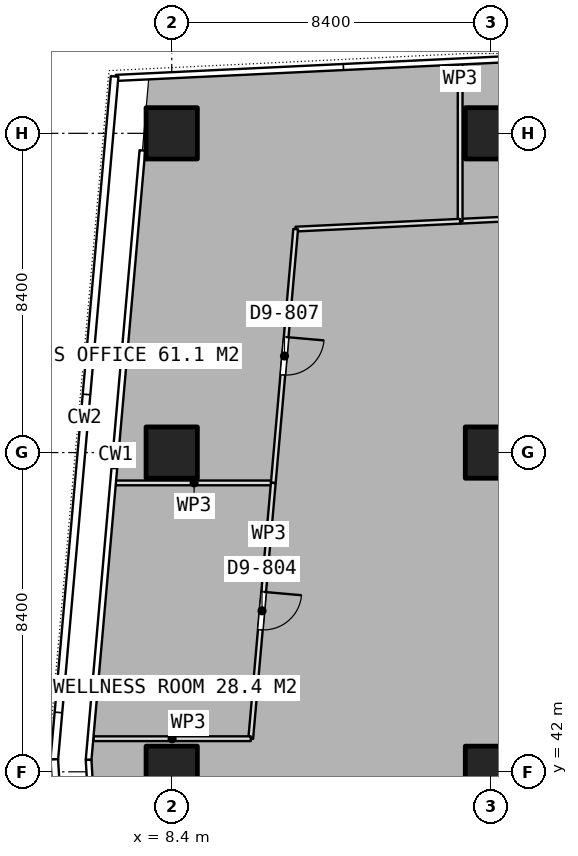
"""IFC4 building model, lengths in metres.
Left out: names, types, materials, properties, quantities, classifications, styles, units other than length and angle.
Written with IfcOpenShell. Run it as: python <this file> out.ifc"""

import sys

from ifc_helpers import new_model, si_unit, direction, frame, frame_2d, origin, origin_2d, place, context, subcontext, project, spatial, rectangle, extrude, element, fill, save


model = new_model("IFC4")
c1 = context("Model", 3, precision=1e-05, world=origin(), true_north=direction((0.0, 1.0)))
c2 = subcontext(c1, "Body", "Model", "MODEL_VIEW")
j1 = project(units=[si_unit("LENGTHUNIT", "METRE"), si_unit("PLANEANGLEUNIT", "RADIAN")], contexts=[c1])
p1 = place(None, origin())
s1 = spatial("IfcSite", under=j1, at=p1, CompositionType="ELEMENT")
p2 = place(p1, origin())
s2 = spatial("IfcBuilding", under=s1, at=p2, CompositionType="ELEMENT")
p3 = place(p2, frame((0.0, 0.0, 198.95)))
s3 = spatial("IfcBuildingStorey", under=s2, at=p3, CompositionType="ELEMENT", Elevation=198.95)
for number, where, z_axis, x_axis in (
    (1, (8.4, 42.0, 0.0), (0.0, 0.0, 1.0), (1.0, 0.0, 0.0)),
    (2, (8.4, 50.4, 0.0), (0.0, 0.0, 1.0), (1.0, 0.0, 0.0)),
    (3, (8.4, 58.8, 0.0), (0.0, 0.0, 1.0), (1.0, 0.0, 0.0)),
    (4, (16.8, 42.0, 0.0), (0.0, 0.0, 1.0), (1.0, 0.0, 0.0)),
    (5, (16.8, 50.4, 0.0), (0.0, 0.0, 1.0), (1.0, 0.0, 0.0)),
    (6, (16.8, 58.8, 0.0), (0.0, 0.0, 1.0), (1.0, 0.0, 0.0)),
):
    element("IfcColumn", number, at=place(p3, frame(where, z_axis=z_axis, x_axis=x_axis)), inside=s3, PredefinedType="COLUMN", context=c2, shape_type="SweptSolid", body=[
        extrude(rectangle(XDim=1.35, YDim=1.35, at=origin_2d()), origin(), (0.0, 0.0, 1.0), 3.75),
    ])
p4 = place(p3, frame((24.317, 56.885, 0.0), z_axis=(0.0, 0.0, 1.0), x_axis=(-0.998859973319, -0.047736293327, 0.0)))
e7 = element("IfcWall", 7, at=p4, inside=s3, PredefinedType="PARTITIONING", context=c2, shape_type="SweptSolid", body=[
    extrude(rectangle(XDim=8.336, YDim=0.125, at=frame_2d((4.168, 0.0))), origin(), (0.0, 0.0, 1.0), 3.5),
])
p5 = place(p4, frame((3.668, 0.0, 0.0)))
e8 = element("IfcOpeningElement", 8, at=p5, cuts=e7, PredefinedType="OPENING", context=c2, shape_type="SweptSolid", body=[
    extrude(rectangle(XDim=1.0, YDim=2.1, at=frame_2d((0.5, 1.05))), frame((0.0, 0.073, 0.0), z_axis=(0.0, -1.0, 0.0), x_axis=(1.0, 0.0, 0.0)), (0.0, 0.0, 1.0), 0.145),
])
p6 = place(p3, frame((15.99, 56.487, 0.0), z_axis=(0.0, 0.0, 1.0), x_axis=(0.0, 1.0, 0.0)))
e9 = element("IfcWall", 9, at=p6, inside=s3, PredefinedType="PARTITIONING", context=c2, shape_type="SweptSolid", body=[
    extrude(rectangle(XDim=4.155, YDim=0.125, at=frame_2d((2.078, 0.0))), origin(), (0.0, 0.0, 1.0), 3.5),
])
p7 = place(p3, frame((11.073, 49.602, 0.0), z_axis=(0.0, 0.0, 1.0), x_axis=(-1.0, 0.0, 0.0)))
e10 = element("IfcWall", 10, at=p7, inside=s3, PredefinedType="PARTITIONING", context=c2, shape_type="SweptSolid", body=[
    extrude(rectangle(XDim=4.167, YDim=0.125, at=frame_2d((2.083, 0.0))), origin(), (0.0, 0.0, 1.0), 3.5),
])
p8 = place(p3, frame((15.989, 56.487, 0.0), z_axis=(0.0, 0.0, 1.0), x_axis=(-0.998857273451, -0.047792753365, 0.0)))
e11 = element("IfcWall", 11, at=p8, inside=s3, PredefinedType="PARTITIONING", context=c2, shape_type="SweptSolid", body=[
    extrude(rectangle(XDim=4.332, YDim=0.125, at=frame_2d((2.166, 0.0))), origin(), (0.0, 0.0, 1.0), 3.5),
])
p9 = place(p3, frame((11.662, 56.28, 0.0), z_axis=(0.0, 0.0, 1.0), x_axis=(-0.087875742136, -0.99613144411, 0.0)))
e12 = element("IfcWall", 12, at=p9, inside=s3, PredefinedType="PARTITIONING", context=c2, shape_type="SweptSolid", body=[
    extrude(rectangle(XDim=6.704, YDim=0.125, at=frame_2d((3.352, 0.0))), origin(), (0.0, 0.0, 1.0), 3.5),
])
p10 = place(p9, frame((2.852, 0.0, 0.0)))
e13 = element("IfcOpeningElement", 13, at=p10, cuts=e12, PredefinedType="OPENING", context=c2, shape_type="SweptSolid", body=[
    extrude(rectangle(XDim=1.0, YDim=2.1, at=frame_2d((0.5, 1.05))), frame((0.0, 0.073, 0.0), z_axis=(0.0, -1.0, 0.0), x_axis=(1.0, 0.0, 0.0)), (0.0, 0.0, 1.0), 0.145),
])
p11 = place(p3, frame((11.073, 49.601, 0.0), z_axis=(0.0, 0.0, 1.0), x_axis=(-0.087919121044, -0.9961276164, 0.0)))
e14 = element("IfcWall", 14, at=p11, inside=s3, PredefinedType="PARTITIONING", context=c2, shape_type="SweptSolid", body=[
    extrude(rectangle(XDim=6.756, YDim=0.125, at=frame_2d((3.378, 0.0))), origin(), (0.0, 0.0, 1.0), 3.5),
])
p12 = place(p11, frame((2.878, 0.0, 0.0)))
e15 = element("IfcOpeningElement", 15, at=p12, cuts=e14, PredefinedType="OPENING", context=c2, shape_type="SweptSolid", body=[
    extrude(rectangle(XDim=1.0, YDim=2.1, at=frame_2d((0.5, 1.05))), frame((0.0, 0.073, 0.0), z_axis=(0.0, -1.0, 0.0), x_axis=(1.0, 0.0, 0.0)), (0.0, 0.0, 1.0), 0.145),
])
p13 = place(p3, frame((10.479, 42.871, 0.0), z_axis=(0.0, 0.0, 1.0), x_axis=(-1.0, 0.0, 0.0)))
e16 = element("IfcWall", 16, at=p13, inside=s3, PredefinedType="PARTITIONING", context=c2, shape_type="SweptSolid", body=[
    extrude(rectangle(XDim=4.137, YDim=0.125, at=frame_2d((2.068, 0.0))), origin(), (0.0, 0.0, 1.0), 3.5),
])
p14 = place(p10, origin())
e17 = element("IfcDoor", 17, at=p14, inside=s3, OperationType="SINGLE_SWING_LEFT", PredefinedType="DOOR", context=c2, shape_type="SweptSolid", body=[
    extrude(rectangle(XDim=1.0, YDim=2.1, at=frame_2d((0.5, 1.05))), frame((0.0, 0.025, 0.0), z_axis=(0.0, -1.0, 0.0), x_axis=(1.0, 0.0, 0.0)), (0.0, 0.0, 1.0), 0.05),
])
fill(e13, e17)
p15 = place(p12, origin())
e18 = element("IfcDoor", 18, at=p15, inside=s3, OperationType="SINGLE_SWING_LEFT", PredefinedType="DOOR", context=c2, shape_type="SweptSolid", body=[
    extrude(rectangle(XDim=1.0, YDim=2.1, at=frame_2d((0.5, 1.05))), frame((0.0, 0.025, 0.0), z_axis=(0.0, -1.0, 0.0), x_axis=(1.0, 0.0, 0.0)), (0.0, 0.0, 1.0), 0.05),
])
fill(e15, e18)
save(model, sys.argv[1])
